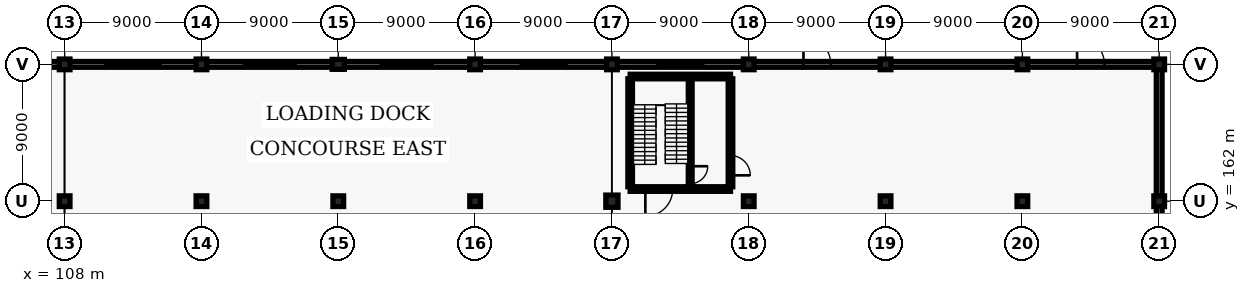
"""IFC4 building model, lengths in metres.
Left out: names, types, materials, properties, quantities, classifications, styles, units other than length and angle.
Written with IfcOpenShell. Run it as: python <this file> out.ifc"""

import sys

from ifc_helpers import new_model, si_unit, direction, frame, frame_2d, origin, origin_2d, place, context, subcontext, project, spatial, rectangle, circle, extrude, element, fill, save


model = new_model("IFC4")
c1 = context("Model", 3, precision=1e-05, world=origin(), true_north=direction((0.0, 1.0)))
c2 = subcontext(c1, "Body", "Model", "MODEL_VIEW")
j1 = project(units=[si_unit("LENGTHUNIT", "METRE"), si_unit("PLANEANGLEUNIT", "RADIAN")], contexts=[c1])
p1 = place(None, origin())
s1 = spatial("IfcSite", under=j1, at=p1, CompositionType="ELEMENT")
p2 = place(p1, origin())
s2 = spatial("IfcBuilding", under=s1, at=p2, CompositionType="ELEMENT")
p3 = place(p2, origin())
s3 = spatial("IfcBuildingStorey", under=s2, at=p3, CompositionType="ELEMENT", Elevation=0.0)
for number, where, z_axis, x_axis in (
    (1, (108.0, 162.0, 0.0), (0.0, 0.0, 1.0), (1.0, 0.0, 0.0)),
    (2, (108.0, 171.0, 0.0), (0.0, 0.0, 1.0), (1.0, 0.0, 0.0)),
    (3, (117.0, 162.0, 0.0), (0.0, 0.0, 1.0), (1.0, 0.0, 0.0)),
    (4, (117.0, 171.0, 0.0), (0.0, 0.0, 1.0), (1.0, 0.0, 0.0)),
    (5, (126.0, 162.0, 0.0), (0.0, 0.0, 1.0), (1.0, 0.0, 0.0)),
):
    element("IfcColumn", number, at=place(p3, frame(where, z_axis=z_axis, x_axis=x_axis)), inside=s3, PredefinedType="COLUMN", context=c2, shape_type="SweptSolid", body=[
        extrude(rectangle(XDim=0.7, YDim=0.7, at=origin_2d()), origin(), (0.0, 0.0, 1.0), 5.4),
    ])
p4 = place(p3, frame((126.0, 171.0, 0.0), z_axis=(0.0, 0.0, 1.0), x_axis=(1.0, 0.0, 0.0)))
e6 = element("IfcColumn", 6, at=p4, inside=s3, PredefinedType="COLUMN", context=c2, shape_type="SweptSolid", body=[
    extrude(rectangle(XDim=0.8, YDim=0.65, at=origin_2d()), origin(), (0.0, 0.0, 1.0), 5.4),
])
for number, where, z_axis, x_axis in (
    (7, (135.0, 162.0, 0.0), (0.0, 0.0, 1.0), (1.0, 0.0, 0.0)),
    (8, (135.0, 171.0, 0.0), (0.0, 0.0, 1.0), (1.0, 0.0, 0.0)),
):
    element("IfcColumn", number, at=place(p3, frame(where, z_axis=z_axis, x_axis=x_axis)), inside=s3, PredefinedType="COLUMN", context=c2, shape_type="SweptSolid", body=[
        extrude(rectangle(XDim=0.7, YDim=0.7, at=origin_2d()), origin(), (0.0, 0.0, 1.0), 5.4),
    ])
p5 = place(p3, frame((144.0, 162.0, 0.0), z_axis=(0.0, 0.0, 1.0), x_axis=(1.0, 0.0, 0.0)))
e9 = element("IfcColumn", 9, at=p5, inside=s3, PredefinedType="COLUMN", context=c2, shape_type="SweptSolid", body=[
    extrude(circle(Radius=0.4, at=origin_2d()), origin(), (0.0, 0.0, 1.0), 5.4),
])
for number, where, z_axis, x_axis in (
    (10, (144.0, 171.0, 0.0), (0.0, 0.0, 1.0), (1.0, 0.0, 0.0)),
    (11, (153.0, 162.0, 0.0), (0.0, 0.0, 1.0), (1.0, 0.0, 0.0)),
    (12, (153.0, 171.0, 0.0), (0.0, 0.0, 1.0), (1.0, 0.0, 0.0)),
    (13, (162.0, 162.0, 0.0), (0.0, 0.0, 1.0), (1.0, 0.0, 0.0)),
    (14, (162.0, 171.0, 0.0), (0.0, 0.0, 1.0), (1.0, 0.0, 0.0)),
    (15, (171.0, 162.0, 0.0), (0.0, 0.0, 1.0), (1.0, 0.0, 0.0)),
    (16, (171.0, 171.0, 0.0), (0.0, 0.0, 1.0), (1.0, 0.0, 0.0)),
    (17, (180.0, 162.0, 0.0), (0.0, 0.0, 1.0), (1.0, 0.0, 0.0)),
    (18, (180.0, 171.0, 0.0), (0.0, 0.0, 1.0), (1.0, 0.0, 0.0)),
):
    element("IfcColumn", number, at=place(p3, frame(where, z_axis=z_axis, x_axis=x_axis)), inside=s3, PredefinedType="COLUMN", context=c2, shape_type="SweptSolid", body=[
        extrude(rectangle(XDim=0.7, YDim=0.7, at=origin_2d()), origin(), (0.0, 0.0, 1.0), 5.4),
    ])
p6 = place(p3, frame((99.06, 171.0, 0.0), z_axis=(0.0, 0.0, 1.0), x_axis=(1.0, 0.0, 0.0)))
e19 = element("IfcWall", 19, at=p6, inside=s3, PredefinedType="SOLIDWALL", context=c2, shape_type="SweptSolid", body=[
    extrude(rectangle(XDim=8.88, YDim=0.38, at=frame_2d((4.44, 0.0))), origin(), (0.0, 0.0, 1.0), 4.55),
])
p7 = place(p6, frame((2.64, 0.0, 0.0)))
e20 = element("IfcOpeningElement", 20, at=p7, cuts=e19, PredefinedType="OPENING", context=c2, shape_type="SweptSolid", body=[
    extrude(rectangle(XDim=3.6, YDim=4.0, at=frame_2d((1.8, 2.0))), frame((0.0, 0.2, 0.0), z_axis=(0.0, -1.0, 0.0), x_axis=(1.0, 0.0, 0.0)), (0.0, 0.0, 1.0), 0.4),
])
p8 = place(p3, frame((108.06, 171.0, 0.0), z_axis=(0.0, 0.0, 1.0), x_axis=(1.0, 0.0, 0.0)))
e21 = element("IfcWall", 21, at=p8, inside=s3, PredefinedType="SOLIDWALL", context=c2, shape_type="SweptSolid", body=[
    extrude(rectangle(XDim=8.88, YDim=0.38, at=frame_2d((4.44, 0.0))), origin(), (0.0, 0.0, 1.0), 4.55),
])
p9 = place(p8, frame((2.64, 0.0, 0.0)))
e22 = element("IfcOpeningElement", 22, at=p9, cuts=e21, PredefinedType="OPENING", context=c2, shape_type="SweptSolid", body=[
    extrude(rectangle(XDim=3.6, YDim=4.0, at=frame_2d((1.8, 2.0))), frame((0.0, 0.2, 0.0), z_axis=(0.0, -1.0, 0.0), x_axis=(1.0, 0.0, 0.0)), (0.0, 0.0, 1.0), 0.4),
])
p10 = place(p3, frame((117.06, 171.0, 0.0), z_axis=(0.0, 0.0, 1.0), x_axis=(1.0, 0.0, 0.0)))
e23 = element("IfcWall", 23, at=p10, inside=s3, PredefinedType="SOLIDWALL", context=c2, shape_type="SweptSolid", body=[
    extrude(rectangle(XDim=8.88, YDim=0.38, at=frame_2d((4.44, 0.0))), origin(), (0.0, 0.0, 1.0), 4.55),
])
p11 = place(p10, frame((2.74, 0.0, 0.0)))
e24 = element("IfcOpeningElement", 24, at=p11, cuts=e23, PredefinedType="OPENING", context=c2, shape_type="SweptSolid", body=[
    extrude(rectangle(XDim=3.4, YDim=3.8, at=frame_2d((1.7, 1.9))), frame((0.0, 0.2, 0.0), z_axis=(0.0, -1.0, 0.0), x_axis=(1.0, 0.0, 0.0)), (0.0, 0.0, 1.0), 0.4),
])
p12 = place(p3, frame((126.06, 171.0, 0.0), z_axis=(0.0, 0.0, 1.0), x_axis=(1.0, 0.0, 0.0)))
e25 = element("IfcWall", 25, at=p12, inside=s3, PredefinedType="SOLIDWALL", context=c2, shape_type="SweptSolid", body=[
    extrude(rectangle(XDim=8.88, YDim=0.38, at=frame_2d((4.44, 0.0))), origin(), (0.0, 0.0, 1.0), 4.55),
])
p13 = place(p12, frame((2.74, 0.0, 0.0)))
e26 = element("IfcOpeningElement", 26, at=p13, cuts=e25, PredefinedType="OPENING", context=c2, shape_type="SweptSolid", body=[
    extrude(rectangle(XDim=3.4, YDim=3.8, at=frame_2d((1.7, 1.9))), frame((0.0, 0.2, 0.0), z_axis=(0.0, -1.0, 0.0), x_axis=(1.0, 0.0, 0.0)), (0.0, 0.0, 1.0), 0.4),
])
p14 = place(p3, frame((135.06, 171.0, 0.0), z_axis=(0.0, 0.0, 1.0), x_axis=(1.0, 0.0, 0.0)))
e27 = element("IfcWall", 27, at=p14, inside=s3, PredefinedType="SOLIDWALL", context=c2, shape_type="SweptSolid", body=[
    extrude(rectangle(XDim=8.88, YDim=0.38, at=frame_2d((4.44, 0.0))), origin(), (0.0, 0.0, 1.0), 4.55),
])
p15 = place(p14, frame((2.94, 0.0, 0.0)))
e28 = element("IfcOpeningElement", 28, at=p15, cuts=e27, PredefinedType="OPENING", context=c2, shape_type="SweptSolid", body=[
    extrude(rectangle(XDim=3.0, YDim=3.4, at=frame_2d((1.5, 1.7))), frame((0.0, 0.2, 0.0), z_axis=(0.0, -1.0, 0.0), x_axis=(1.0, 0.0, 0.0)), (0.0, 0.0, 1.0), 0.4),
])
p16 = place(p3, frame((144.06, 171.0, 0.0), z_axis=(0.0, 0.0, 1.0), x_axis=(1.0, 0.0, 0.0)))
e29 = element("IfcWall", 29, at=p16, inside=s3, PredefinedType="SOLIDWALL", context=c2, shape_type="SweptSolid", body=[
    extrude(rectangle(XDim=8.88, YDim=0.38, at=frame_2d((4.44, 0.0))), origin(), (0.0, 0.0, 1.0), 4.55),
])
p17 = place(p16, frame((2.94, 0.0, 0.0)))
e30 = element("IfcOpeningElement", 30, at=p17, cuts=e29, PredefinedType="OPENING", context=c2, shape_type="SweptSolid", body=[
    extrude(rectangle(XDim=3.0, YDim=3.4, at=frame_2d((1.5, 1.7))), frame((0.0, 0.2, 0.0), z_axis=(0.0, -1.0, 0.0), x_axis=(1.0, 0.0, 0.0)), (0.0, 0.0, 1.0), 0.4),
])
p18 = place(p3, frame((153.06, 171.0, 0.0), z_axis=(0.0, 0.0, 1.0), x_axis=(1.0, 0.0, 0.0)))
e31 = element("IfcWall", 31, at=p18, inside=s3, PredefinedType="SOLIDWALL", context=c2, shape_type="SweptSolid", body=[
    extrude(rectangle(XDim=8.88, YDim=0.38, at=frame_2d((4.44, 0.0))), origin(), (0.0, 0.0, 1.0), 4.55),
])
p19 = place(p18, frame((3.54, 0.0, 0.0)))
e32 = element("IfcOpeningElement", 32, at=p19, cuts=e31, PredefinedType="OPENING", context=c2, shape_type="SweptSolid", body=[
    extrude(rectangle(XDim=1.8, YDim=2.15, at=frame_2d((0.9, 1.075))), frame((0.0, 0.2, 0.0), z_axis=(0.0, -1.0, 0.0), x_axis=(1.0, 0.0, 0.0)), (0.0, 0.0, 1.0), 0.4),
])
p20 = place(p3, frame((162.06, 171.0, 0.0), z_axis=(0.0, 0.0, 1.0), x_axis=(1.0, 0.0, 0.0)))
e33 = element("IfcWall", 33, at=p20, inside=s3, PredefinedType="SOLIDWALL", context=c2, shape_type="SweptSolid", body=[
    extrude(rectangle(XDim=8.88, YDim=0.38, at=frame_2d((4.44, 0.0))), origin(), (0.0, 0.0, 1.0), 4.55),
])
p21 = place(p3, frame((171.06, 171.0, 0.0), z_axis=(0.0, 0.0, 1.0), x_axis=(1.0, 0.0, 0.0)))
e34 = element("IfcWall", 34, at=p21, inside=s3, PredefinedType="SOLIDWALL", context=c2, shape_type="SweptSolid", body=[
    extrude(rectangle(XDim=8.88, YDim=0.38, at=frame_2d((4.44, 0.0))), origin(), (0.0, 0.0, 1.0), 4.55),
])
p22 = place(p21, frame((3.54, 0.0, 0.0)))
e35 = element("IfcOpeningElement", 35, at=p22, cuts=e34, PredefinedType="OPENING", context=c2, shape_type="SweptSolid", body=[
    extrude(rectangle(XDim=1.8, YDim=2.15, at=frame_2d((0.9, 1.075))), frame((0.0, 0.2, 0.0), z_axis=(0.0, -1.0, 0.0), x_axis=(1.0, 0.0, 0.0)), (0.0, 0.0, 1.0), 0.4),
])
p23 = place(p3, frame((180.0, 153.06, 0.0), z_axis=(0.0, 0.0, 1.0), x_axis=(0.0, 1.0, 0.0)))
e36 = element("IfcWall", 36, at=p23, inside=s3, PredefinedType="SOLIDWALL", context=c2, shape_type="SweptSolid", body=[
    extrude(rectangle(XDim=8.88, YDim=0.38, at=frame_2d((4.44, 0.0))), origin(), (0.0, 0.0, 1.0), 4.55),
])
p24 = place(p23, frame((3.54, 0.0, 0.0)))
e37 = element("IfcOpeningElement", 37, at=p24, cuts=e36, PredefinedType="OPENING", context=c2, shape_type="SweptSolid", body=[
    extrude(rectangle(XDim=1.8, YDim=2.15, at=frame_2d((0.9, 1.075))), frame((0.0, 0.2, 0.0), z_axis=(0.0, -1.0, 0.0), x_axis=(1.0, 0.0, 0.0)), (0.0, 0.0, 1.0), 0.4),
])
p25 = place(p3, frame((180.0, 162.06, 0.0), z_axis=(0.0, 0.0, 1.0), x_axis=(0.0, 1.0, 0.0)))
e38 = element("IfcWall", 38, at=p25, inside=s3, PredefinedType="SOLIDWALL", context=c2, shape_type="SweptSolid", body=[
    extrude(rectangle(XDim=8.88, YDim=0.38, at=frame_2d((4.44, 0.0))), origin(), (0.0, 0.0, 1.0), 4.55),
])
p26 = place(p3, frame((145.2, 162.8, 0.0), z_axis=(0.0, 0.0, 1.0), x_axis=(1.0, 0.0, 0.0)))
e39 = element("IfcWall", 39, at=p26, inside=s3, PredefinedType="SHEAR", context=c2, shape_type="SweptSolid", body=[
    extrude(rectangle(XDim=6.6, YDim=0.3, at=frame_2d((3.3, 0.0))), origin(), (0.0, 0.0, 1.0), 5.4),
])
p27 = place(p26, frame((1.0, 0.0, 0.0)))
e40 = element("IfcOpeningElement", 40, at=p27, cuts=e39, PredefinedType="OPENING", context=c2, shape_type="SweptSolid", body=[
    extrude(rectangle(XDim=1.8, YDim=2.15, at=frame_2d((0.9, 1.075))), frame((0.0, 0.16, 0.0), z_axis=(0.0, -1.0, 0.0), x_axis=(1.0, 0.0, 0.0)), (0.0, 0.0, 1.0), 0.32),
])
p28 = place(p3, frame((145.2, 170.2, 0.0), z_axis=(0.0, 0.0, 1.0), x_axis=(1.0, 0.0, 0.0)))
e41 = element("IfcWall", 41, at=p28, inside=s3, PredefinedType="SHEAR", context=c2, shape_type="SweptSolid", body=[
    extrude(rectangle(XDim=6.6, YDim=0.3, at=frame_2d((3.3, 0.0))), origin(), (0.0, 0.0, 1.0), 5.4),
])
p29 = place(p3, frame((145.2, 162.95, 0.0), z_axis=(0.0, 0.0, 1.0), x_axis=(0.0, 1.0, 0.0)))
e42 = element("IfcWall", 42, at=p29, inside=s3, PredefinedType="SHEAR", context=c2, shape_type="SweptSolid", body=[
    extrude(rectangle(XDim=7.1, YDim=0.3, at=frame_2d((3.55, 0.0))), origin(), (0.0, 0.0, 1.0), 5.4),
])
p30 = place(p3, frame((151.8, 162.95, 0.0), z_axis=(0.0, 0.0, 1.0), x_axis=(0.0, 1.0, 0.0)))
e43 = element("IfcWall", 43, at=p30, inside=s3, PredefinedType="SHEAR", context=c2, shape_type="SweptSolid", body=[
    extrude(rectangle(XDim=7.1, YDim=0.3, at=frame_2d((3.55, 0.0))), origin(), (0.0, 0.0, 1.0), 5.4),
])
p31 = place(p30, frame((0.75, 0.0, 0.0)))
e44 = element("IfcOpeningElement", 44, at=p31, cuts=e43, PredefinedType="OPENING", context=c2, shape_type="SweptSolid", body=[
    extrude(rectangle(XDim=1.3, YDim=2.15, at=frame_2d((0.65, 1.075))), frame((0.0, 0.16, 0.0), z_axis=(0.0, -1.0, 0.0), x_axis=(1.0, 0.0, 0.0)), (0.0, 0.0, 1.0), 0.32),
])
p32 = place(p3, frame((149.15, 162.95, 0.0), z_axis=(0.0, 0.0, 1.0), x_axis=(0.0, 1.0, 0.0)))
e45 = element("IfcWall", 45, at=p32, inside=s3, PredefinedType="SHEAR", context=c2, shape_type="SweptSolid", body=[
    extrude(rectangle(XDim=7.1, YDim=0.25, at=frame_2d((3.55, 0.0))), origin(), (0.0, 0.0, 1.0), 5.4),
])
p33 = place(p32, frame((0.2, 0.0, 0.0)))
e46 = element("IfcOpeningElement", 46, at=p33, cuts=e45, PredefinedType="OPENING", context=c2, shape_type="SweptSolid", body=[
    extrude(rectangle(XDim=1.15, YDim=2.15, at=frame_2d((0.575, 1.075))), frame((0.0, 0.135, 0.0), z_axis=(0.0, -1.0, 0.0), x_axis=(1.0, 0.0, 0.0)), (0.0, 0.0, 1.0), 0.27),
])
p34 = place(p9, origin())
e47 = element("IfcDoor", 47, at=p34, inside=s3, OperationType="ROLLINGUP", PredefinedType="GATE", context=c2, shape_type="SweptSolid", body=[
    extrude(rectangle(XDim=3.6, YDim=4.0, at=frame_2d((1.8, 2.0))), frame((0.0, 0.025, 0.0), z_axis=(0.0, -1.0, 0.0), x_axis=(1.0, 0.0, 0.0)), (0.0, 0.0, 1.0), 0.05),
])
fill(e22, e47)
p35 = place(p11, origin())
e48 = element("IfcDoor", 48, at=p35, inside=s3, OperationType="ROLLINGUP", PredefinedType="GATE", context=c2, shape_type="SweptSolid", body=[
    extrude(rectangle(XDim=3.4, YDim=3.8, at=frame_2d((1.7, 1.9))), frame((0.0, 0.025, 0.0), z_axis=(0.0, -1.0, 0.0), x_axis=(1.0, 0.0, 0.0)), (0.0, 0.0, 1.0), 0.05),
])
fill(e24, e48)
p36 = place(p13, origin())
e49 = element("IfcDoor", 49, at=p36, inside=s3, OperationType="ROLLINGUP", PredefinedType="GATE", context=c2, shape_type="SweptSolid", body=[
    extrude(rectangle(XDim=3.4, YDim=3.8, at=frame_2d((1.7, 1.9))), frame((0.0, 0.025, 0.0), z_axis=(0.0, -1.0, 0.0), x_axis=(1.0, 0.0, 0.0)), (0.0, 0.0, 1.0), 0.05),
])
fill(e26, e49)
p37 = place(p15, origin())
e50 = element("IfcDoor", 50, at=p37, inside=s3, OperationType="ROLLINGUP", PredefinedType="GATE", context=c2, shape_type="SweptSolid", body=[
    extrude(rectangle(XDim=3.0, YDim=3.4, at=frame_2d((1.5, 1.7))), frame((0.0, 0.025, 0.0), z_axis=(0.0, -1.0, 0.0), x_axis=(1.0, 0.0, 0.0)), (0.0, 0.0, 1.0), 0.05),
])
fill(e28, e50)
p38 = place(p17, origin())
e51 = element("IfcDoor", 51, at=p38, inside=s3, OperationType="ROLLINGUP", PredefinedType="GATE", context=c2, shape_type="SweptSolid", body=[
    extrude(rectangle(XDim=3.0, YDim=3.4, at=frame_2d((1.5, 1.7))), frame((0.0, 0.025, 0.0), z_axis=(0.0, -1.0, 0.0), x_axis=(1.0, 0.0, 0.0)), (0.0, 0.0, 1.0), 0.05),
])
fill(e30, e51)
p39 = place(p19, origin())
e52 = element("IfcDoor", 52, at=p39, inside=s3, OperationType="DOUBLE_DOOR_SINGLE_SWING", PredefinedType="DOOR", context=c2, shape_type="SweptSolid", body=[
    extrude(rectangle(XDim=1.8, YDim=2.15, at=frame_2d((0.9, 1.075))), frame((0.0, 0.025, 0.0), z_axis=(0.0, -1.0, 0.0), x_axis=(1.0, 0.0, 0.0)), (0.0, 0.0, 1.0), 0.05),
])
fill(e32, e52)
p40 = place(p22, origin())
e53 = element("IfcDoor", 53, at=p40, inside=s3, OperationType="DOUBLE_DOOR_SINGLE_SWING", PredefinedType="DOOR", context=c2, shape_type="SweptSolid", body=[
    extrude(rectangle(XDim=1.8, YDim=2.15, at=frame_2d((0.9, 1.075))), frame((0.0, 0.025, 0.0), z_axis=(0.0, -1.0, 0.0), x_axis=(1.0, 0.0, 0.0)), (0.0, 0.0, 1.0), 0.05),
])
fill(e35, e53)
p41 = place(p31, frame((1.3, 0.0, 0.0), z_axis=(0.0, 0.0, 1.0), x_axis=(-1.0, 0.0, 0.0)))
e54 = element("IfcDoor", 54, at=p41, inside=s3, OperationType="DOUBLE_DOOR_SINGLE_SWING", PredefinedType="DOOR", context=c2, shape_type="SweptSolid", body=[
    extrude(rectangle(XDim=1.3, YDim=2.15, at=frame_2d((0.65, 1.075))), frame((0.0, 0.025, 0.0), z_axis=(0.0, -1.0, 0.0), x_axis=(1.0, 0.0, 0.0)), (0.0, 0.0, 1.0), 0.05),
])
fill(e44, e54)
p42 = place(p33, origin())
e55 = element("IfcDoor", 55, at=p42, inside=s3, OperationType="SINGLE_SWING_RIGHT", PredefinedType="DOOR", context=c2, shape_type="SweptSolid", body=[
    extrude(rectangle(XDim=1.15, YDim=2.15, at=frame_2d((0.575, 1.075))), frame((0.0, 0.025, 0.0), z_axis=(0.0, -1.0, 0.0), x_axis=(1.0, 0.0, 0.0)), (0.0, 0.0, 1.0), 0.05),
])
fill(e46, e55)
p43 = place(p27, frame((1.8, 0.0, 0.0), z_axis=(0.0, 0.0, 1.0), x_axis=(-1.0, 0.0, 0.0)))
e56 = element("IfcDoor", 56, at=p43, inside=s3, OperationType="DOUBLE_DOOR_SINGLE_SWING", PredefinedType="DOOR", context=c2, shape_type="SweptSolid", body=[
    extrude(rectangle(XDim=1.8, YDim=2.15, at=frame_2d((0.9, 1.075))), frame((0.0, 0.025, 0.0), z_axis=(0.0, -1.0, 0.0), x_axis=(1.0, 0.0, 0.0)), (0.0, 0.0, 1.0), 0.05),
])
fill(e40, e56)
save(model, sys.argv[1])
